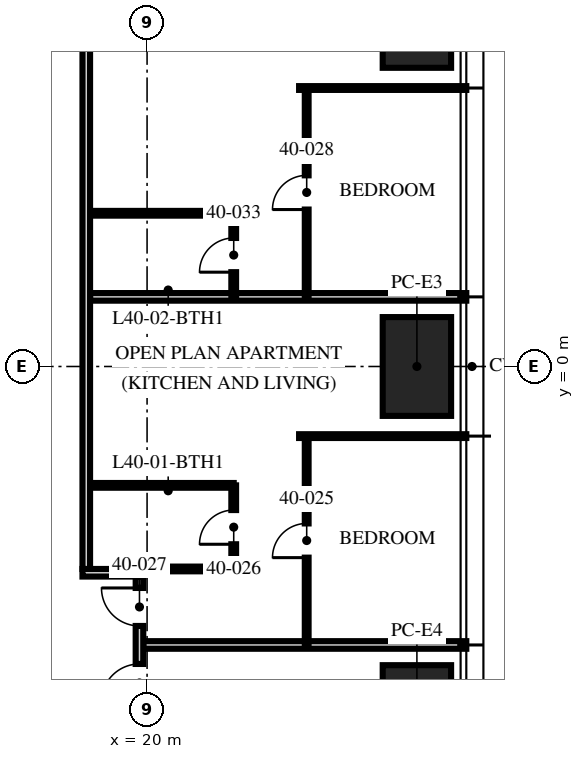
"""IFC4 building model, lengths in metres.
Left out: names, types, materials, properties, quantities, classifications, styles, units other than length and angle.
Written with IfcOpenShell. Run it as: python <this file> out.ifc"""

import sys

from ifc_helpers import new_model, si_unit, direction, frame, frame_2d, origin, origin_2d, place, context, subcontext, project, spatial, rectangle, extrude, element, fill, save


model = new_model("IFC4")
c1 = context("Model", 3, precision=1e-05, world=origin(), true_north=direction((0.0, 1.0)))
c2 = subcontext(c1, "Body", "Model", "MODEL_VIEW")
j1 = project(units=[si_unit("LENGTHUNIT", "METRE"), si_unit("PLANEANGLEUNIT", "RADIAN")], contexts=[c1])
p1 = place(None, origin())
s1 = spatial("IfcSite", under=j1, at=p1, CompositionType="ELEMENT")
p2 = place(p1, origin())
s2 = spatial("IfcBuilding", under=s1, at=p2, CompositionType="ELEMENT")
p3 = place(p2, frame((0.0, 0.0, 159.75)))
s3 = spatial("IfcBuildingStorey", under=s2, at=p3, CompositionType="ELEMENT", Elevation=159.75)
for number, where, z_axis, x_axis in (
    (1, (27.1, 9.16, 0.0), (0.0, 0.0, 1.0), (0.0, 1.0, 0.0)),
    (2, (27.1, 0.0, 0.0), (0.0, 0.0, 1.0), (0.0, 1.0, 0.0)),
    (3, (27.1, -9.16, 0.0), (0.0, 0.0, 1.0), (0.0, 1.0, 0.0)),
):
    element("IfcColumn", number, at=place(p3, frame(where, z_axis=z_axis, x_axis=x_axis)), inside=s3, PredefinedType="COLUMN", context=c2, shape_type="SweptSolid", body=[
        extrude(rectangle(XDim=2.6, YDim=1.8, at=origin_2d()), origin(), (0.0, 0.0, 1.0), 3.75),
    ])
p4 = place(p3, frame((19.9, -7.328, 0.0), z_axis=(0.0, 0.0, 1.0), x_axis=(1.0, 0.0, 0.0)))
e4 = element("IfcWall", 4, at=p4, inside=s3, PredefinedType="PARTITIONING", context=c2, shape_type="SweptSolid", body=[
    extrude(rectangle(XDim=8.5, YDim=0.2, at=frame_2d((4.25, 0.0))), origin(), (0.0, 0.0, 1.0), 2.81),
])
p5 = place(p3, frame((24.0, -1.832, 0.0), z_axis=(0.0, 0.0, 1.0), x_axis=(1.0, 0.0, 0.0)))
e5 = element("IfcWall", 5, at=p5, inside=s3, PredefinedType="PARTITIONING", context=c2, shape_type="SweptSolid", body=[
    extrude(rectangle(XDim=4.4, YDim=0.1, at=frame_2d((2.2, 0.0))), origin(), (0.0, 0.0, 1.0), 2.81),
])
p6 = place(p3, frame((18.5, 1.832, 0.0), z_axis=(0.0, 0.0, 1.0), x_axis=(1.0, 0.0, 0.0)))
e6 = element("IfcWall", 6, at=p6, inside=s3, PredefinedType="PARTITIONING", context=c2, shape_type="SweptSolid", body=[
    extrude(rectangle(XDim=9.9, YDim=0.2, at=frame_2d((4.95, 0.0))), origin(), (0.0, 0.0, 1.0), 2.81),
])
p7 = place(p3, frame((24.0, 7.328, 0.0), z_axis=(0.0, 0.0, 1.0), x_axis=(1.0, 0.0, 0.0)))
e7 = element("IfcWall", 7, at=p7, inside=s3, PredefinedType="PARTITIONING", context=c2, shape_type="SweptSolid", body=[
    extrude(rectangle(XDim=4.4, YDim=0.1, at=frame_2d((2.2, 0.0))), origin(), (0.0, 0.0, 1.0), 2.81),
])
p8 = place(p3, frame((24.2, -7.328, 0.0), z_axis=(0.0, 0.0, 1.0), x_axis=(0.0, 1.0, 0.0)))
e8 = element("IfcWall", 8, at=p8, inside=s3, PredefinedType="PARTITIONING", context=c2, shape_type="SweptSolid", body=[
    extrude(rectangle(XDim=5.496, YDim=0.1, at=frame_2d((2.748, 0.0))), origin(), (0.0, 0.0, 1.0), 2.81),
])
p9 = place(p8, frame((2.298, 0.0, 0.0)))
e9 = element("IfcOpeningElement", 9, at=p9, cuts=e8, PredefinedType="OPENING", context=c2, shape_type="SweptSolid", body=[
    extrude(rectangle(XDim=0.9, YDim=2.1, at=frame_2d((0.45, 1.05))), frame((0.0, 0.06, 0.0), z_axis=(0.0, -1.0, 0.0), x_axis=(1.0, 0.0, 0.0)), (0.0, 0.0, 1.0), 0.12),
])
p10 = place(p3, frame((22.28, -5.328, 0.0), z_axis=(0.0, 0.0, 1.0), x_axis=(0.0, 1.0, 0.0)))
e10 = element("IfcWall", 10, at=p10, inside=s3, PredefinedType="PARTITIONING", context=c2, shape_type="SweptSolid", body=[
    extrude(rectangle(XDim=2.2, YDim=0.125, at=frame_2d((1.1, 0.0))), origin(), (0.0, 0.0, 1.0), 2.81),
])
p11 = place(p10, frame((0.65, 0.0, 0.0)))
e11 = element("IfcOpeningElement", 11, at=p11, cuts=e10, PredefinedType="OPENING", context=c2, shape_type="SweptSolid", body=[
    extrude(rectangle(XDim=0.9, YDim=2.1, at=frame_2d((0.45, 1.05))), frame((0.0, 0.073, 0.0), z_axis=(0.0, -1.0, 0.0), x_axis=(1.0, 0.0, 0.0)), (0.0, 0.0, 1.0), 0.145),
])
p12 = place(p3, frame((19.97, -5.328, 0.0), z_axis=(0.0, 0.0, 1.0), x_axis=(1.0, 0.0, 0.0)))
e12 = element("IfcWall", 12, at=p12, inside=s3, PredefinedType="PARTITIONING", context=c2, shape_type="SweptSolid", body=[
    extrude(rectangle(XDim=2.31, YDim=0.125, at=frame_2d((1.155, 0.0))), origin(), (0.0, 0.0, 1.0), 3.5),
])
p13 = place(p3, frame((18.5, -3.128, 0.0), z_axis=(0.0, 0.0, 1.0), x_axis=(1.0, 0.0, 0.0)))
e13 = element("IfcWall", 13, at=p13, inside=s3, PredefinedType="PARTITIONING", context=c2, shape_type="SweptSolid", body=[
    extrude(rectangle(XDim=3.78, YDim=0.125, at=frame_2d((1.89, 0.0))), origin(), (0.0, 0.0, 1.0), 3.5),
])
p14 = place(p3, frame((24.2, 1.832, 0.0), z_axis=(0.0, 0.0, 1.0), x_axis=(0.0, 1.0, 0.0)))
e14 = element("IfcWall", 14, at=p14, inside=s3, PredefinedType="PARTITIONING", context=c2, shape_type="SweptSolid", body=[
    extrude(rectangle(XDim=5.496, YDim=0.1, at=frame_2d((2.748, 0.0))), origin(), (0.0, 0.0, 1.0), 2.81),
])
p15 = place(p14, frame((2.298, 0.0, 0.0)))
e15 = element("IfcOpeningElement", 15, at=p15, cuts=e14, PredefinedType="OPENING", context=c2, shape_type="SweptSolid", body=[
    extrude(rectangle(XDim=0.9, YDim=2.1, at=frame_2d((0.45, 1.05))), frame((0.0, 0.06, 0.0), z_axis=(0.0, -1.0, 0.0), x_axis=(1.0, 0.0, 0.0)), (0.0, 0.0, 1.0), 0.12),
])
p16 = place(p3, frame((22.28, 1.832, 0.0), z_axis=(0.0, 0.0, 1.0), x_axis=(0.0, 1.0, 0.0)))
e16 = element("IfcWall", 16, at=p16, inside=s3, PredefinedType="PARTITIONING", context=c2, shape_type="SweptSolid", body=[
    extrude(rectangle(XDim=2.2, YDim=0.125, at=frame_2d((1.1, 0.0))), origin(), (0.0, 0.0, 1.0), 3.5),
])
p17 = place(p16, frame((0.65, 0.0, 0.0)))
e17 = element("IfcOpeningElement", 17, at=p17, cuts=e16, PredefinedType="OPENING", context=c2, shape_type="SweptSolid", body=[
    extrude(rectangle(XDim=0.9, YDim=2.1, at=frame_2d((0.45, 1.05))), frame((0.0, 0.073, 0.0), z_axis=(0.0, -1.0, 0.0), x_axis=(1.0, 0.0, 0.0)), (0.0, 0.0, 1.0), 0.145),
])
p18 = place(p3, frame((18.5, 4.032, 0.0), z_axis=(0.0, 0.0, 1.0), x_axis=(1.0, 0.0, 0.0)))
e18 = element("IfcWall", 18, at=p18, inside=s3, PredefinedType="PARTITIONING", context=c2, shape_type="SweptSolid", body=[
    extrude(rectangle(XDim=3.78, YDim=0.125, at=frame_2d((1.89, 0.0))), origin(), (0.0, 0.0, 1.0), 3.5),
])
p19 = place(p3, frame((18.3, -5.428, 0.0), z_axis=(0.0, 0.0, 1.0), x_axis=(1.0, 0.0, 0.0)))
e19 = element("IfcWall", 19, at=p19, inside=s3, PredefinedType="PARTITIONING", context=c2, shape_type="SweptSolid", body=[
    extrude(rectangle(XDim=1.6, YDim=0.2, at=frame_2d((0.8, 0.0))), origin(), (0.0, 0.0, 1.0), 3.5),
])
p20 = place(p3, frame((19.8, -9.128, 0.0), z_axis=(0.0, 0.0, 1.0), x_axis=(0.0, 1.0, 0.0)))
e20 = element("IfcWall", 20, at=p20, inside=s3, PredefinedType="PARTITIONING", context=c2, shape_type="SweptSolid", body=[
    extrude(rectangle(XDim=3.6, YDim=0.2, at=frame_2d((1.8, 0.0))), origin(), (0.0, 0.0, 1.0), 2.7),
])
p21 = place(p20, frame((2.3, 0.0, 0.0)))
e21 = element("IfcOpeningElement", 21, at=p21, cuts=e20, PredefinedType="OPENING", context=c2, shape_type="SweptSolid", body=[
    extrude(rectangle(XDim=1.0, YDim=2.2, at=frame_2d((0.5, 1.1))), frame((0.0, 0.11, 0.0), z_axis=(0.0, -1.0, 0.0), x_axis=(1.0, 0.0, 0.0)), (0.0, 0.0, 1.0), 0.22),
])
p22 = place(p20, frame((0.3, 0.0, 0.0)))
e22 = element("IfcOpeningElement", 22, at=p22, cuts=e20, PredefinedType="OPENING", context=c2, shape_type="SweptSolid", body=[
    extrude(rectangle(XDim=1.0, YDim=2.2, at=frame_2d((0.5, 1.1))), frame((0.0, 0.11, 0.0), z_axis=(0.0, -1.0, 0.0), x_axis=(1.0, 0.0, 0.0)), (0.0, 0.0, 1.0), 0.22),
])
p23 = place(p3, frame((18.4, -5.328, 0.0), z_axis=(0.0, 0.0, 1.0), x_axis=(0.0, 1.0, 0.0)))
e23 = element("IfcWall", 23, at=p23, inside=s3, PredefinedType="PARTITIONING", context=c2, shape_type="SweptSolid", body=[
    extrude(rectangle(XDim=22.028, YDim=0.2, at=frame_2d((11.014, 0.0))), origin(), (0.0, 0.0, 1.0), 2.7),
])
p24 = place(p23, frame((19.68, 0.0, 0.0)))
e24 = element("IfcOpeningElement", 24, at=p24, cuts=e23, PredefinedType="OPENING", context=c2, shape_type="SweptSolid", body=[
    extrude(rectangle(XDim=1.0, YDim=2.2, at=frame_2d((0.5, 1.1))), frame((0.0, 0.11, 0.0), z_axis=(0.0, -1.0, 0.0), x_axis=(1.0, 0.0, 0.0)), (0.0, 0.0, 1.0), 0.22),
])
p25 = place(p9, origin())
e25 = element("IfcDoor", 25, at=p25, inside=s3, OperationType="SINGLE_SWING_LEFT", PredefinedType="DOOR", context=c2, shape_type="SweptSolid", body=[
    extrude(rectangle(XDim=0.9, YDim=2.1, at=frame_2d((0.45, 1.05))), frame((0.0, 0.025, 0.0), z_axis=(0.0, -1.0, 0.0), x_axis=(1.0, 0.0, 0.0)), (0.0, 0.0, 1.0), 0.05),
])
fill(e9, e25)
p26 = place(p11, origin())
e26 = element("IfcDoor", 26, at=p26, inside=s3, OperationType="SINGLE_SWING_LEFT", PredefinedType="DOOR", context=c2, shape_type="SweptSolid", body=[
    extrude(rectangle(XDim=0.9, YDim=2.1, at=frame_2d((0.45, 1.05))), frame((0.0, 0.025, 0.0), z_axis=(0.0, -1.0, 0.0), x_axis=(1.0, 0.0, 0.0)), (0.0, 0.0, 1.0), 0.05),
])
fill(e11, e26)
p27 = place(p21, origin())
e27 = element("IfcDoor", 27, at=p27, inside=s3, OperationType="SINGLE_SWING_RIGHT", PredefinedType="DOOR", context=c2, shape_type="SweptSolid", body=[
    extrude(rectangle(XDim=1.0, YDim=2.2, at=frame_2d((0.5, 1.1))), frame((0.0, 0.025, 0.0), z_axis=(0.0, -1.0, 0.0), x_axis=(1.0, 0.0, 0.0)), (0.0, 0.0, 1.0), 0.05),
])
fill(e21, e27)
p28 = place(p15, origin())
e28 = element("IfcDoor", 28, at=p28, inside=s3, OperationType="SINGLE_SWING_LEFT", PredefinedType="DOOR", context=c2, shape_type="SweptSolid", body=[
    extrude(rectangle(XDim=0.9, YDim=2.1, at=frame_2d((0.45, 1.05))), frame((0.0, 0.025, 0.0), z_axis=(0.0, -1.0, 0.0), x_axis=(1.0, 0.0, 0.0)), (0.0, 0.0, 1.0), 0.05),
])
fill(e15, e28)
p29 = place(p17, origin())
e29 = element("IfcDoor", 29, at=p29, inside=s3, OperationType="SINGLE_SWING_LEFT", PredefinedType="DOOR", context=c2, shape_type="SweptSolid", body=[
    extrude(rectangle(XDim=0.9, YDim=2.1, at=frame_2d((0.45, 1.05))), frame((0.0, 0.025, 0.0), z_axis=(0.0, -1.0, 0.0), x_axis=(1.0, 0.0, 0.0)), (0.0, 0.0, 1.0), 0.05),
])
fill(e17, e29)
p30 = place(p22, origin())
e30 = element("IfcDoor", 30, at=p30, inside=s3, OperationType="SINGLE_SWING_LEFT", PredefinedType="DOOR", context=c2, shape_type="SweptSolid", body=[
    extrude(rectangle(XDim=1.0, YDim=2.2, at=frame_2d((0.5, 1.1))), frame((0.0, 0.025, 0.0), z_axis=(0.0, -1.0, 0.0), x_axis=(1.0, 0.0, 0.0)), (0.0, 0.0, 1.0), 0.05),
])
fill(e22, e30)
save(model, sys.argv[1])
